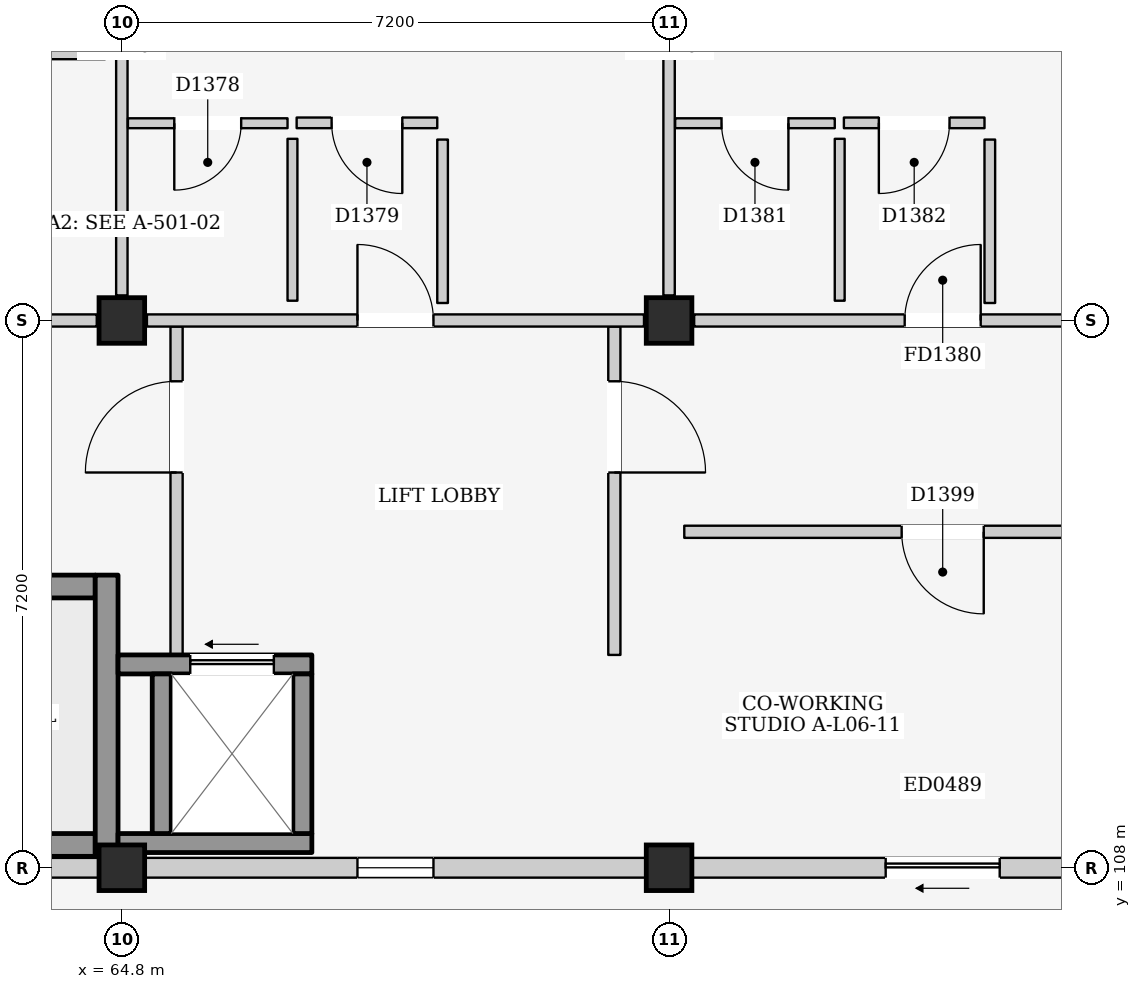
"""IFC4 building model, lengths in metres.
Left out: names, types, materials, properties, quantities, classifications, styles, units other than length and angle.
Written with IfcOpenShell. Run it as: python <this file> out.ifc"""

import sys

from ifc_helpers import new_model, si_unit, direction, frame, frame_2d, origin, origin_2d, place, context, subcontext, project, spatial, rectangle, extrude, element, fill, save


model = new_model("IFC4")
c1 = context("Model", 3, precision=1e-05, world=origin(), true_north=direction((0.0, 1.0)))
c2 = subcontext(c1, "Body", "Model", "MODEL_VIEW")
j1 = project(units=[si_unit("LENGTHUNIT", "METRE"), si_unit("PLANEANGLEUNIT", "RADIAN")], contexts=[c1])
p1 = place(None, origin())
s1 = spatial("IfcSite", under=j1, at=p1, CompositionType="ELEMENT")
p2 = place(p1, origin())
s2 = spatial("IfcBuilding", under=s1, at=p2, CompositionType="ELEMENT")
p3 = place(p2, frame((0.0, 0.0, 21.9)))
s3 = spatial("IfcBuildingStorey", under=s2, at=p3, CompositionType="ELEMENT", Elevation=21.9)
for number, where, z_axis, x_axis in (
    (1, (64.8, 108.0, 0.0), (0.0, 0.0, 1.0), (1.0, 0.0, 0.0)),
    (2, (64.8, 115.2, 0.0), (0.0, 0.0, 1.0), (1.0, 0.0, 0.0)),
    (3, (72.0, 108.0, 0.0), (0.0, 0.0, 1.0), (1.0, 0.0, 0.0)),
    (4, (72.0, 115.2, 0.0), (0.0, 0.0, 1.0), (1.0, 0.0, 0.0)),
):
    element("IfcColumn", number, at=place(p3, frame(where, z_axis=z_axis, x_axis=x_axis)), inside=s3, PredefinedType="COLUMN", context=c2, shape_type="SweptSolid", body=[
        extrude(rectangle(XDim=0.6, YDim=0.6, at=origin_2d()), origin(), (0.0, 0.0, 1.0), 3.2),
    ])
p4 = place(p3, frame((57.9, 108.0, 0.0), z_axis=(0.0, 0.0, 1.0), x_axis=(1.0, 0.0, 0.0)))
e5 = element("IfcWall", 5, at=p4, inside=s3, PredefinedType="ELEMENTEDWALL", context=c2, shape_type="SweptSolid", body=[
    extrude(rectangle(XDim=6.6, YDim=0.26, at=frame_2d((3.3, 0.0))), origin(), (0.0, 0.0, 1.0), 2.315),
])
p5 = place(p4, frame((2.8, 0.0, 1.2)))
e6 = element("IfcOpeningElement", 6, at=p5, cuts=e5, PredefinedType="OPENING", context=c2, shape_type="SweptSolid", body=[
    extrude(rectangle(XDim=1.0, YDim=0.9, at=frame_2d((0.5, 0.45))), frame((0.0, 0.145, 0.0), z_axis=(0.0, -1.0, 0.0), x_axis=(1.0, 0.0, 0.0)), (0.0, 0.0, 1.0), 0.29),
])
p6 = place(p3, frame((65.1, 108.0, 0.0), z_axis=(0.0, 0.0, 1.0), x_axis=(1.0, 0.0, 0.0)))
e7 = element("IfcWall", 7, at=p6, inside=s3, PredefinedType="ELEMENTEDWALL", context=c2, shape_type="SweptSolid", body=[
    extrude(rectangle(XDim=6.6, YDim=0.26, at=frame_2d((3.3, 0.0))), origin(), (0.0, 0.0, 1.0), 2.315),
])
p7 = place(p6, frame((2.8, 0.0, 1.2)))
e8 = element("IfcOpeningElement", 8, at=p7, cuts=e7, PredefinedType="OPENING", context=c2, shape_type="SweptSolid", body=[
    extrude(rectangle(XDim=1.0, YDim=0.9, at=frame_2d((0.5, 0.45))), frame((0.0, 0.145, 0.0), z_axis=(0.0, -1.0, 0.0), x_axis=(1.0, 0.0, 0.0)), (0.0, 0.0, 1.0), 0.29),
])
p8 = place(p3, frame((72.3, 108.0, 0.0), z_axis=(0.0, 0.0, 1.0), x_axis=(1.0, 0.0, 0.0)))
e9 = element("IfcWall", 9, at=p8, inside=s3, PredefinedType="ELEMENTEDWALL", context=c2, shape_type="SweptSolid", body=[
    extrude(rectangle(XDim=6.6, YDim=0.26, at=frame_2d((3.3, 0.0))), origin(), (0.0, 0.0, 1.0), 2.315),
])
p9 = place(p8, frame((2.55, 0.0, 0.0)))
e10 = element("IfcOpeningElement", 10, at=p9, cuts=e9, PredefinedType="OPENING", context=c2, shape_type="SweptSolid", body=[
    extrude(rectangle(XDim=1.5, YDim=2.12, at=frame_2d((0.75, 1.06))), frame((0.0, 0.145, 0.0), z_axis=(0.0, -1.0, 0.0), x_axis=(1.0, 0.0, 0.0)), (0.0, 0.0, 1.0), 0.29),
])
p10 = place(p3, frame((57.95, 108.3, 0.0), z_axis=(0.0, 0.0, 1.0), x_axis=(1.0, 0.0, 0.0)))
e11 = element("IfcWall", 11, at=p10, inside=s3, PredefinedType="SHEAR", context=c2, shape_type="SweptSolid", body=[
    extrude(rectangle(XDim=6.5, YDim=0.3, at=frame_2d((3.25, 0.0))), origin(), (0.0, 0.0, 1.0), 2.98),
])
p11 = place(p3, frame((57.95, 111.7, 0.0), z_axis=(0.0, 0.0, 1.0), x_axis=(1.0, 0.0, 0.0)))
e12 = element("IfcWall", 12, at=p11, inside=s3, PredefinedType="SHEAR", context=c2, shape_type="SweptSolid", body=[
    extrude(rectangle(XDim=6.5, YDim=0.3, at=frame_2d((3.25, 0.0))), origin(), (0.0, 0.0, 1.0), 2.98),
])
p12 = place(p11, frame((0.18, 0.0, 0.0)))
e13 = element("IfcOpeningElement", 13, at=p12, cuts=e12, PredefinedType="OPENING", context=c2, shape_type="SweptSolid", body=[
    extrude(rectangle(XDim=1.15, YDim=2.2, at=frame_2d((0.575, 1.1))), frame((0.0, 0.165, 0.0), z_axis=(0.0, -1.0, 0.0), x_axis=(1.0, 0.0, 0.0)), (0.0, 0.0, 1.0), 0.33),
])
p13 = place(p3, frame((64.6, 108.15, 0.0), z_axis=(0.0, 0.0, 1.0), x_axis=(0.0, 1.0, 0.0)))
e14 = element("IfcWall", 14, at=p13, inside=s3, PredefinedType="SHEAR", context=c2, shape_type="SweptSolid", body=[
    extrude(rectangle(XDim=3.7, YDim=0.3, at=frame_2d((1.85, 0.0))), origin(), (0.0, 0.0, 1.0), 2.98),
])
p14 = place(p3, frame((65.52, 110.8, 0.0), z_axis=(0.0, 0.0, 1.0), x_axis=(0.0, 1.0, 0.0)))
e15 = element("IfcWall", 15, at=p14, inside=s3, PredefinedType="PARTITIONING", context=c2, shape_type="SweptSolid", body=[
    extrude(rectangle(XDim=4.32, YDim=0.16, at=frame_2d((2.16, 0.0))), origin(), (0.0, 0.0, 1.0), 2.98),
])
p15 = place(p14, frame((2.4, 0.0, 0.0)))
e16 = element("IfcOpeningElement", 16, at=p15, cuts=e15, PredefinedType="OPENING", context=c2, shape_type="SweptSolid", body=[
    extrude(rectangle(XDim=1.2, YDim=2.2, at=frame_2d((0.6, 1.1))), frame((0.0, 0.095, 0.0), z_axis=(0.0, -1.0, 0.0), x_axis=(1.0, 0.0, 0.0)), (0.0, 0.0, 1.0), 0.19),
])
p16 = place(p3, frame((71.28, 110.8, 0.0), z_axis=(0.0, 0.0, 1.0), x_axis=(0.0, 1.0, 0.0)))
e17 = element("IfcWall", 17, at=p16, inside=s3, PredefinedType="PARTITIONING", context=c2, shape_type="SweptSolid", body=[
    extrude(rectangle(XDim=4.32, YDim=0.16, at=frame_2d((2.16, 0.0))), origin(), (0.0, 0.0, 1.0), 2.98),
])
p17 = place(p16, frame((2.4, 0.0, 0.0)))
e18 = element("IfcOpeningElement", 18, at=p17, cuts=e17, PredefinedType="OPENING", context=c2, shape_type="SweptSolid", body=[
    extrude(rectangle(XDim=1.2, YDim=2.2, at=frame_2d((0.6, 1.1))), frame((0.0, 0.095, 0.0), z_axis=(0.0, -1.0, 0.0), x_axis=(1.0, 0.0, 0.0)), (0.0, 0.0, 1.0), 0.19),
])
p18 = place(p3, frame((64.75, 108.325, 0.0), z_axis=(0.0, 0.0, 1.0), x_axis=(1.0, 0.0, 0.0)))
e19 = element("IfcWall", 19, at=p18, inside=s3, PredefinedType="SHEAR", context=c2, shape_type="SweptSolid", body=[
    extrude(rectangle(XDim=2.55, YDim=0.25, at=frame_2d((1.275, 0.0))), origin(), (0.0, 0.0, 1.0), 2.98),
])
p19 = place(p3, frame((64.75, 110.675, 0.0), z_axis=(0.0, 0.0, 1.0), x_axis=(1.0, 0.0, 0.0)))
e20 = element("IfcWall", 20, at=p19, inside=s3, PredefinedType="SHEAR", context=c2, shape_type="SweptSolid", body=[
    extrude(rectangle(XDim=2.55, YDim=0.25, at=frame_2d((1.275, 0.0))), origin(), (0.0, 0.0, 1.0), 2.98),
])
p20 = place(p19, frame((0.95, 0.0, 0.0)))
e21 = element("IfcOpeningElement", 21, at=p20, cuts=e20, PredefinedType="OPENING", context=c2, shape_type="SweptSolid", body=[
    extrude(rectangle(XDim=1.1, YDim=2.15, at=frame_2d((0.55, 1.075))), frame((0.0, 0.14, 0.0), z_axis=(0.0, -1.0, 0.0), x_axis=(1.0, 0.0, 0.0)), (0.0, 0.0, 1.0), 0.28),
])
for number, where, z_axis, x_axis in (
    (22, (65.325, 108.45, 0.0), (0.0, 0.0, 1.0), (0.0, 1.0, 0.0)),
    (23, (67.175, 108.45, 0.0), (0.0, 0.0, 1.0), (0.0, 1.0, 0.0)),
):
    element("IfcWall", number, at=place(p3, frame(where, z_axis=z_axis, x_axis=x_axis)), inside=s3, PredefinedType="SHEAR", context=c2, shape_type="SweptSolid", body=[
        extrude(rectangle(XDim=2.1, YDim=0.25, at=frame_2d((1.05, 0.0))), origin(), (0.0, 0.0, 1.0), 2.98),
    ])
p21 = place(p3, frame((57.93, 115.2, 0.0), z_axis=(0.0, 0.0, 1.0), x_axis=(1.0, 0.0, 0.0)))
e24 = element("IfcWall", 24, at=p21, inside=s3, PredefinedType="PARTITIONING", context=c2, shape_type="SweptSolid", body=[
    extrude(rectangle(XDim=6.54, YDim=0.16, at=frame_2d((3.27, 0.0))), origin(), (0.0, 0.0, 1.0), 2.315),
])
p22 = place(p21, frame((2.77, 0.0, 0.0)))
e25 = element("IfcOpeningElement", 25, at=p22, cuts=e24, PredefinedType="OPENING", context=c2, shape_type="SweptSolid", body=[
    extrude(rectangle(XDim=1.0, YDim=2.15, at=frame_2d((0.5, 1.075))), frame((0.0, 0.095, 0.0), z_axis=(0.0, -1.0, 0.0), x_axis=(1.0, 0.0, 0.0)), (0.0, 0.0, 1.0), 0.19),
])
p23 = place(p3, frame((64.8, 115.53, 0.0), z_axis=(0.0, 0.0, 1.0), x_axis=(0.0, 1.0, 0.0)))
e26 = element("IfcWall", 26, at=p23, inside=s3, PredefinedType="PARTITIONING", context=c2, shape_type="SweptSolid", body=[
    extrude(rectangle(XDim=6.54, YDim=0.15, at=frame_2d((3.27, 0.0))), origin(), (0.0, 0.0, 1.0), 2.465),
])
p24 = place(p3, frame((61.52, 118.7, 0.0), z_axis=(0.0, 0.0, 1.0), x_axis=(1.0, 0.0, 0.0)))
e27 = element("IfcWall", 27, at=p24, inside=s3, PredefinedType="PARTITIONING", context=c2, shape_type="SweptSolid", body=[
    extrude(rectangle(XDim=3.06, YDim=0.125, at=frame_2d((1.53, 0.0))), origin(), (0.0, 0.0, 1.0), 2.98),
])
p25 = place(p3, frame((65.13, 115.2, 0.0), z_axis=(0.0, 0.0, 1.0), x_axis=(1.0, 0.0, 0.0)))
e28 = element("IfcWall", 28, at=p25, inside=s3, PredefinedType="PARTITIONING", context=c2, shape_type="SweptSolid", body=[
    extrude(rectangle(XDim=6.54, YDim=0.16, at=frame_2d((3.27, 0.0))), origin(), (0.0, 0.0, 1.0), 2.315),
])
p26 = place(p25, frame((2.77, 0.0, 0.0)))
e29 = element("IfcOpeningElement", 29, at=p26, cuts=e28, PredefinedType="OPENING", context=c2, shape_type="SweptSolid", body=[
    extrude(rectangle(XDim=1.0, YDim=2.15, at=frame_2d((0.5, 1.075))), frame((0.0, 0.095, 0.0), z_axis=(0.0, -1.0, 0.0), x_axis=(1.0, 0.0, 0.0)), (0.0, 0.0, 1.0), 0.19),
])
p27 = place(p3, frame((72.0, 115.53, 0.0), z_axis=(0.0, 0.0, 1.0), x_axis=(0.0, 1.0, 0.0)))
e30 = element("IfcWall", 30, at=p27, inside=s3, PredefinedType="PARTITIONING", context=c2, shape_type="SweptSolid", body=[
    extrude(rectangle(XDim=6.54, YDim=0.15, at=frame_2d((3.27, 0.0))), origin(), (0.0, 0.0, 1.0), 2.465),
])
p28 = place(p3, frame((64.88, 117.795, 0.0), z_axis=(0.0, 0.0, 1.0), x_axis=(1.0, 0.0, 0.0)))
e31 = element("IfcWall", 31, at=p28, inside=s3, PredefinedType="PARTITIONING", context=c2, shape_type="SweptSolid", body=[
    extrude(rectangle(XDim=2.1, YDim=0.13, at=frame_2d((1.05, 0.0))), origin(), (0.0, 0.0, 1.0), 2.98),
])
p29 = place(p28, frame((0.61, 0.0, 0.0)))
e32 = element("IfcOpeningElement", 32, at=p29, cuts=e31, PredefinedType="OPENING", context=c2, shape_type="SweptSolid", body=[
    extrude(rectangle(XDim=0.88, YDim=2.1, at=frame_2d((0.44, 1.05))), frame((0.0, 0.08, 0.0), z_axis=(0.0, -1.0, 0.0), x_axis=(1.0, 0.0, 0.0)), (0.0, 0.0, 1.0), 0.16),
])
p30 = place(p3, frame((67.045, 115.46, 0.0), z_axis=(0.0, 0.0, 1.0), x_axis=(0.0, 1.0, 0.0)))
e33 = element("IfcWall", 33, at=p30, inside=s3, PredefinedType="PARTITIONING", context=c2, shape_type="SweptSolid", body=[
    extrude(rectangle(XDim=2.13, YDim=0.13, at=frame_2d((1.065, 0.0))), origin(), (0.0, 0.0, 1.0), 2.98),
])
p31 = place(p3, frame((67.1, 117.8, 0.0), z_axis=(0.0, 0.0, 1.0), x_axis=(1.0, 0.0, 0.0)))
e34 = element("IfcWall", 34, at=p31, inside=s3, PredefinedType="PARTITIONING", context=c2, shape_type="SweptSolid", body=[
    extrude(rectangle(XDim=1.85, YDim=0.14, at=frame_2d((0.925, 0.0))), origin(), (0.0, 0.0, 1.0), 2.98),
])
p32 = place(p31, frame((0.46, 0.0, 0.0)))
e35 = element("IfcOpeningElement", 35, at=p32, cuts=e34, PredefinedType="OPENING", context=c2, shape_type="SweptSolid", body=[
    extrude(rectangle(XDim=0.93, YDim=2.14, at=frame_2d((0.465, 1.07))), frame((0.0, 0.085, 0.0), z_axis=(0.0, -1.0, 0.0), x_axis=(1.0, 0.0, 0.0)), (0.0, 0.0, 1.0), 0.17),
])
p33 = place(p3, frame((69.02, 115.43, 0.0), z_axis=(0.0, 0.0, 1.0), x_axis=(0.0, 1.0, 0.0)))
e36 = element("IfcWall", 36, at=p33, inside=s3, PredefinedType="PARTITIONING", context=c2, shape_type="SweptSolid", body=[
    extrude(rectangle(XDim=2.15, YDim=0.14, at=frame_2d((1.075, 0.0))), origin(), (0.0, 0.0, 1.0), 2.98),
])
p34 = place(p3, frame((72.33, 115.2, 0.0), z_axis=(0.0, 0.0, 1.0), x_axis=(1.0, 0.0, 0.0)))
e37 = element("IfcWall", 37, at=p34, inside=s3, PredefinedType="PARTITIONING", context=c2, shape_type="SweptSolid", body=[
    extrude(rectangle(XDim=6.54, YDim=0.16, at=frame_2d((3.27, 0.0))), origin(), (0.0, 0.0, 1.0), 2.315),
])
p35 = place(p34, frame((2.77, 0.0, 0.0)))
e38 = element("IfcOpeningElement", 38, at=p35, cuts=e37, PredefinedType="OPENING", context=c2, shape_type="SweptSolid", body=[
    extrude(rectangle(XDim=1.0, YDim=2.15, at=frame_2d((0.5, 1.075))), frame((0.0, 0.095, 0.0), z_axis=(0.0, -1.0, 0.0), x_axis=(1.0, 0.0, 0.0)), (0.0, 0.0, 1.0), 0.19),
])
p36 = place(p3, frame((72.08, 117.795, 0.0), z_axis=(0.0, 0.0, 1.0), x_axis=(1.0, 0.0, 0.0)))
e39 = element("IfcWall", 39, at=p36, inside=s3, PredefinedType="PARTITIONING", context=c2, shape_type="SweptSolid", body=[
    extrude(rectangle(XDim=2.1, YDim=0.13, at=frame_2d((1.05, 0.0))), origin(), (0.0, 0.0, 1.0), 2.98),
])
p37 = place(p36, frame((0.61, 0.0, 0.0)))
e40 = element("IfcOpeningElement", 40, at=p37, cuts=e39, PredefinedType="OPENING", context=c2, shape_type="SweptSolid", body=[
    extrude(rectangle(XDim=0.88, YDim=2.1, at=frame_2d((0.44, 1.05))), frame((0.0, 0.08, 0.0), z_axis=(0.0, -1.0, 0.0), x_axis=(1.0, 0.0, 0.0)), (0.0, 0.0, 1.0), 0.16),
])
p38 = place(p3, frame((74.245, 115.46, 0.0), z_axis=(0.0, 0.0, 1.0), x_axis=(0.0, 1.0, 0.0)))
e41 = element("IfcWall", 41, at=p38, inside=s3, PredefinedType="PARTITIONING", context=c2, shape_type="SweptSolid", body=[
    extrude(rectangle(XDim=2.13, YDim=0.13, at=frame_2d((1.065, 0.0))), origin(), (0.0, 0.0, 1.0), 2.98),
])
p39 = place(p3, frame((74.3, 117.8, 0.0), z_axis=(0.0, 0.0, 1.0), x_axis=(1.0, 0.0, 0.0)))
e42 = element("IfcWall", 42, at=p39, inside=s3, PredefinedType="PARTITIONING", context=c2, shape_type="SweptSolid", body=[
    extrude(rectangle(XDim=1.85, YDim=0.14, at=frame_2d((0.925, 0.0))), origin(), (0.0, 0.0, 1.0), 2.98),
])
p40 = place(p39, frame((0.46, 0.0, 0.0)))
e43 = element("IfcOpeningElement", 43, at=p40, cuts=e42, PredefinedType="OPENING", context=c2, shape_type="SweptSolid", body=[
    extrude(rectangle(XDim=0.93, YDim=2.14, at=frame_2d((0.465, 1.07))), frame((0.0, 0.085, 0.0), z_axis=(0.0, -1.0, 0.0), x_axis=(1.0, 0.0, 0.0)), (0.0, 0.0, 1.0), 0.17),
])
p41 = place(p3, frame((76.22, 115.43, 0.0), z_axis=(0.0, 0.0, 1.0), x_axis=(0.0, 1.0, 0.0)))
e44 = element("IfcWall", 44, at=p41, inside=s3, PredefinedType="PARTITIONING", context=c2, shape_type="SweptSolid", body=[
    extrude(rectangle(XDim=2.15, YDim=0.14, at=frame_2d((1.075, 0.0))), origin(), (0.0, 0.0, 1.0), 2.98),
])
p42 = place(p3, frame((72.2, 112.42, 0.0), z_axis=(0.0, 0.0, 1.0), x_axis=(1.0, 0.0, 0.0)))
e45 = element("IfcWall", 45, at=p42, inside=s3, PredefinedType="PARTITIONING", context=c2, shape_type="SweptSolid", body=[
    extrude(rectangle(XDim=6.8, YDim=0.16, at=frame_2d((3.4, 0.0))), origin(), (0.0, 0.0, 1.0), 2.98),
])
p43 = place(p42, frame((2.86, 0.0, 0.0)))
e46 = element("IfcOpeningElement", 46, at=p43, cuts=e45, PredefinedType="OPENING", context=c2, shape_type="SweptSolid", body=[
    extrude(rectangle(XDim=1.08, YDim=2.22, at=frame_2d((0.54, 1.11))), frame((0.0, 0.095, 0.0), z_axis=(0.0, -1.0, 0.0), x_axis=(1.0, 0.0, 0.0)), (0.0, 0.0, 1.0), 0.19),
])
p44 = place(p7, origin())
e47 = element("IfcWindow", 47, at=p44, inside=s3, PartitioningType="SINGLE_PANEL", PredefinedType="WINDOW", context=c2, shape_type="SweptSolid", body=[
    extrude(rectangle(XDim=1.0, YDim=0.9, at=frame_2d((0.5, 0.45))), frame((0.0, 0.03, 0.0), z_axis=(0.0, -1.0, 0.0), x_axis=(1.0, 0.0, 0.0)), (0.0, 0.0, 1.0), 0.06),
])
fill(e8, e47)
p45 = place(p9, frame((1.5, 0.0, 0.0), z_axis=(0.0, 0.0, 1.0), x_axis=(-1.0, 0.0, 0.0)))
e48 = element("IfcDoor", 48, at=p45, inside=s3, OperationType="SLIDING_TO_LEFT", PredefinedType="DOOR", context=c2, shape_type="SweptSolid", body=[
    extrude(rectangle(XDim=1.5, YDim=2.12, at=frame_2d((0.75, 1.06))), frame((0.0, 0.025, 0.0), z_axis=(0.0, -1.0, 0.0), x_axis=(1.0, 0.0, 0.0)), (0.0, 0.0, 1.0), 0.05),
])
fill(e10, e48)
p46 = place(p15, origin())
e49 = element("IfcDoor", 49, at=p46, inside=s3, OperationType="SINGLE_SWING_LEFT", PredefinedType="DOOR", context=c2, shape_type="SweptSolid", body=[
    extrude(rectangle(XDim=1.2, YDim=2.2, at=frame_2d((0.6, 1.1))), frame((0.0, 0.025, 0.0), z_axis=(0.0, -1.0, 0.0), x_axis=(1.0, 0.0, 0.0)), (0.0, 0.0, 1.0), 0.05),
])
fill(e16, e49)
p47 = place(p17, frame((1.2, 0.0, 0.0), z_axis=(0.0, 0.0, 1.0), x_axis=(-1.0, 0.0, 0.0)))
e50 = element("IfcDoor", 50, at=p47, inside=s3, OperationType="SINGLE_SWING_RIGHT", PredefinedType="DOOR", context=c2, shape_type="SweptSolid", body=[
    extrude(rectangle(XDim=1.2, YDim=2.2, at=frame_2d((0.6, 1.1))), frame((0.0, 0.025, 0.0), z_axis=(0.0, -1.0, 0.0), x_axis=(1.0, 0.0, 0.0)), (0.0, 0.0, 1.0), 0.05),
])
fill(e18, e50)
p48 = place(p20, origin())
e51 = element("IfcDoor", 51, at=p48, inside=s3, OperationType="SLIDING_TO_LEFT", PredefinedType="DOOR", context=c2, shape_type="SweptSolid", body=[
    extrude(rectangle(XDim=1.1, YDim=2.15, at=frame_2d((0.55, 1.075))), frame((0.0, 0.025, 0.0), z_axis=(0.0, -1.0, 0.0), x_axis=(1.0, 0.0, 0.0)), (0.0, 0.0, 1.0), 0.05),
])
fill(e21, e51)
p49 = place(p26, origin())
e52 = element("IfcDoor", 52, at=p49, inside=s3, OperationType="SINGLE_SWING_LEFT", PredefinedType="DOOR", context=c2, shape_type="SweptSolid", body=[
    extrude(rectangle(XDim=1.0, YDim=2.15, at=frame_2d((0.5, 1.075))), frame((0.0, 0.025, 0.0), z_axis=(0.0, -1.0, 0.0), x_axis=(1.0, 0.0, 0.0)), (0.0, 0.0, 1.0), 0.05),
])
fill(e29, e52)
p50 = place(p29, frame((0.88, 0.0, 0.0), z_axis=(0.0, 0.0, 1.0), x_axis=(-1.0, 0.0, 0.0)))
e53 = element("IfcDoor", 53, at=p50, inside=s3, OperationType="SINGLE_SWING_RIGHT", PredefinedType="DOOR", context=c2, shape_type="SweptSolid", body=[
    extrude(rectangle(XDim=0.88, YDim=2.1, at=frame_2d((0.44, 1.05))), frame((0.0, 0.025, 0.0), z_axis=(0.0, -1.0, 0.0), x_axis=(1.0, 0.0, 0.0)), (0.0, 0.0, 1.0), 0.05),
])
fill(e32, e53)
p51 = place(p32, frame((0.93, 0.0, 0.0), z_axis=(0.0, 0.0, 1.0), x_axis=(-1.0, 0.0, 0.0)))
e54 = element("IfcDoor", 54, at=p51, inside=s3, OperationType="SINGLE_SWING_LEFT", PredefinedType="DOOR", context=c2, shape_type="SweptSolid", body=[
    extrude(rectangle(XDim=0.93, YDim=2.14, at=frame_2d((0.465, 1.07))), frame((0.0, 0.025, 0.0), z_axis=(0.0, -1.0, 0.0), x_axis=(1.0, 0.0, 0.0)), (0.0, 0.0, 1.0), 0.05),
])
fill(e35, e54)
p52 = place(p35, origin())
e55 = element("IfcDoor", 55, at=p52, inside=s3, OperationType="SINGLE_SWING_RIGHT", PredefinedType="DOOR", context=c2, shape_type="SweptSolid", body=[
    extrude(rectangle(XDim=1.0, YDim=2.15, at=frame_2d((0.5, 1.075))), frame((0.0, 0.025, 0.0), z_axis=(0.0, -1.0, 0.0), x_axis=(1.0, 0.0, 0.0)), (0.0, 0.0, 1.0), 0.05),
])
fill(e38, e55)
p53 = place(p37, frame((0.88, 0.0, 0.0), z_axis=(0.0, 0.0, 1.0), x_axis=(-1.0, 0.0, 0.0)))
e56 = element("IfcDoor", 56, at=p53, inside=s3, OperationType="SINGLE_SWING_LEFT", PredefinedType="DOOR", context=c2, shape_type="SweptSolid", body=[
    extrude(rectangle(XDim=0.88, YDim=2.1, at=frame_2d((0.44, 1.05))), frame((0.0, 0.025, 0.0), z_axis=(0.0, -1.0, 0.0), x_axis=(1.0, 0.0, 0.0)), (0.0, 0.0, 1.0), 0.05),
])
fill(e40, e56)
p54 = place(p40, frame((0.93, 0.0, 0.0), z_axis=(0.0, 0.0, 1.0), x_axis=(-1.0, 0.0, 0.0)))
e57 = element("IfcDoor", 57, at=p54, inside=s3, OperationType="SINGLE_SWING_RIGHT", PredefinedType="DOOR", context=c2, shape_type="SweptSolid", body=[
    extrude(rectangle(XDim=0.93, YDim=2.14, at=frame_2d((0.465, 1.07))), frame((0.0, 0.025, 0.0), z_axis=(0.0, -1.0, 0.0), x_axis=(1.0, 0.0, 0.0)), (0.0, 0.0, 1.0), 0.05),
])
fill(e43, e57)
p55 = place(p43, frame((1.08, 0.0, 0.0), z_axis=(0.0, 0.0, 1.0), x_axis=(-1.0, 0.0, 0.0)))
e58 = element("IfcDoor", 58, at=p55, inside=s3, OperationType="SINGLE_SWING_LEFT", PredefinedType="DOOR", context=c2, shape_type="SweptSolid", body=[
    extrude(rectangle(XDim=1.08, YDim=2.22, at=frame_2d((0.54, 1.11))), frame((0.0, 0.025, 0.0), z_axis=(0.0, -1.0, 0.0), x_axis=(1.0, 0.0, 0.0)), (0.0, 0.0, 1.0), 0.05),
])
fill(e46, e58)
save(model, sys.argv[1])
